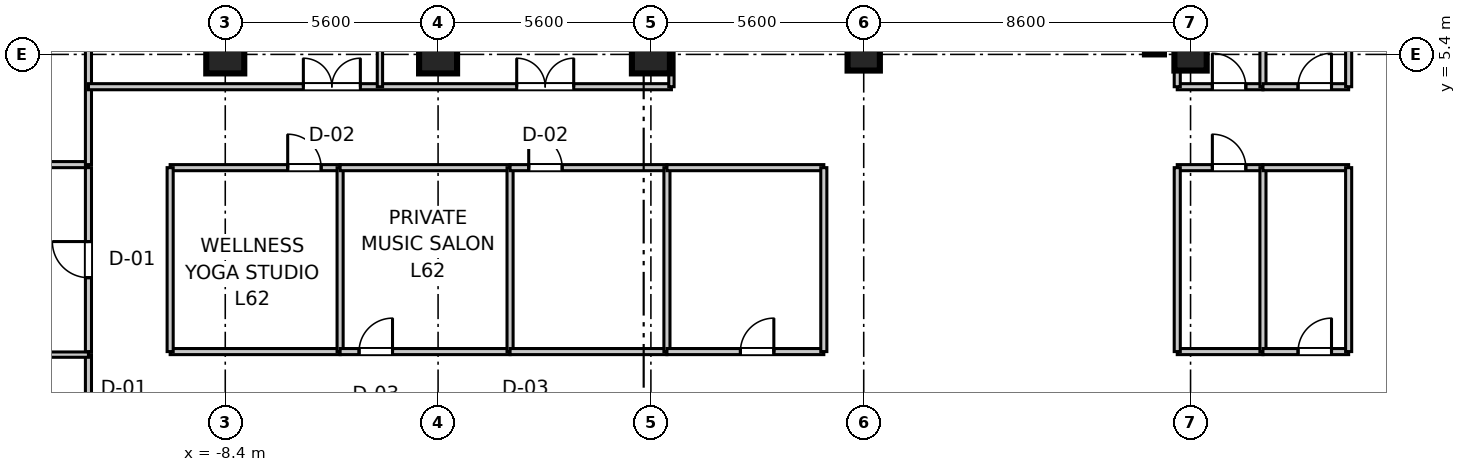
"""IFC4 building model, lengths in metres.
Left out: names, types, materials, properties, quantities, classifications, styles, units other than length and angle.
Written with IfcOpenShell. Run it as: python <this file> out.ifc"""

import sys

from ifc_helpers import new_model, si_unit, direction, frame, frame_2d, origin, origin_2d, place, context, subcontext, project, spatial, rectangle, extrude, source, transform, mapped, element, fill, save


model = new_model("IFC4")
c1 = context("Model", 3, precision=1e-05, world=origin(), true_north=direction((0.0, 1.0)))
c2 = subcontext(c1, "Body", "Model", "MODEL_VIEW")
j1 = project(units=[si_unit("LENGTHUNIT", "METRE"), si_unit("PLANEANGLEUNIT", "RADIAN")], contexts=[c1])
p1 = place(None, origin())
s1 = spatial("IfcSite", under=j1, at=p1, CompositionType="ELEMENT")
p2 = place(p1, origin())
s2 = spatial("IfcBuilding", under=s1, at=p2, CompositionType="ELEMENT")
p3 = place(p2, frame((0.0, 0.0, 241.9)))
s3 = spatial("IfcBuildingStorey", under=s2, at=p3, CompositionType="ELEMENT", Elevation=241.9)
m1 = source(origin(), c2, "Body", "SweptSolid", [
    extrude(rectangle(XDim=1.0, YDim=1.0, at=origin_2d()), origin(), (0.0, 0.0, 1.0), 3.655),
])
for number, where, z_axis, x_axis in (
    (1, (-8.4, 5.4, 0.0), (0.0, 0.0, 1.0), (1.0, 0.0, 0.0)),
    (2, (-2.8, 5.4, 0.0), (0.0, 0.0, 1.0), (1.0, 0.0, 0.0)),
    (3, (2.8, 5.4, 0.0), (0.0, 0.0, 1.0), (1.0, 0.0, 0.0)),
):
    element("IfcColumn", number, at=place(p3, frame(where, z_axis=z_axis, x_axis=x_axis)), inside=s3, PredefinedType="COLUMN", context=c2, shape_type="MappedRepresentation", body=[
        mapped(m1, transform((0.0, 0.0, 0.0), scale=1.0)),
    ])
m2 = source(origin(), c2, "Body", "SweptSolid", [
    extrude(rectangle(XDim=0.85, YDim=0.85, at=origin_2d()), origin(), (0.0, 0.0, 1.0), 3.655),
])
for number, where, z_axis, x_axis in (
    (4, (8.4, 5.4, 0.0), (0.0, 0.0, 1.0), (1.0, 0.0, 0.0)),
    (5, (17.0, 5.4, 0.0), (0.0, 0.0, 1.0), (1.0, 0.0, 0.0)),
):
    element("IfcColumn", number, at=place(p3, frame(where, z_axis=z_axis, x_axis=x_axis)), inside=s3, PredefinedType="PILASTER", context=c2, shape_type="MappedRepresentation", body=[
        mapped(m2, transform((0.0, 0.0, 0.0), scale=1.0)),
    ])
m3 = source(origin(), c2, "Body", "SweptSolid", [
    extrude(rectangle(XDim=11.6, YDim=0.5, at=frame_2d((5.8, 0.0))), origin(), (0.0, 0.0, 1.0), 3.41),
])
p4 = place(p3, frame((16.05, 5.4, 0.0), z_axis=(0.0, 0.0, 1.0), x_axis=(0.0, 1.0, 0.0)))
e6 = element("IfcWall", 6, at=p4, inside=s3, PredefinedType="SHEAR", context=c2, shape_type="MappedRepresentation", body=[
    mapped(m3, transform((0.0, 0.0, 0.0), scale=1.0)),
])
m4 = source(origin(), c2, "Body", "SweptSolid", [
    extrude(rectangle(XDim=2.255, YDim=0.16, at=frame_2d((1.127, 0.0))), origin(), (0.0, 0.0, 1.0), 2.75),
])
p5 = place(p3, frame((16.65, 4.55, 0.0), z_axis=(0.0, 0.0, 1.0), x_axis=(1.0, 0.0, 0.0)))
e7 = element("IfcWall", 7, at=p5, inside=s3, PredefinedType="PARTITIONING", context=c2, shape_type="MappedRepresentation", body=[
    mapped(m4, transform((0.0, 0.0, 0.0), scale=1.0)),
])
p6 = place(p5, frame((0.924, 0.0, 0.0)))
e8 = element("IfcOpeningElement", 8, at=p6, cuts=e7, PredefinedType="OPENING", context=c2, shape_type="SweptSolid", body=[
    extrude(rectangle(XDim=0.88, YDim=2.1, at=frame_2d((0.44, 1.05))), frame((0.0, 0.09, 0.0), z_axis=(0.0, -1.0, 0.0), x_axis=(1.0, 0.0, 0.0)), (0.0, 0.0, 1.0), 0.18),
])
m5 = source(origin(), c2, "Body", "SweptSolid", [
    extrude(rectangle(XDim=19.35, YDim=0.16, at=frame_2d((9.675, 0.0))), origin(), (0.0, 0.0, 1.0), 2.75),
])
for number, where, z_axis, x_axis in (
    (9, (16.65, 4.55, 0.0), (0.0, 0.0, 1.0), (0.0, 1.0, 0.0)),
    (10, (18.905, 4.55, 0.0), (0.0, 0.0, 1.0), (0.0, 1.0, 0.0)),
):
    element("IfcWall", number, at=place(p3, frame(where, z_axis=z_axis, x_axis=x_axis)), inside=s3, PredefinedType="PARTITIONING", context=c2, shape_type="MappedRepresentation", body=[
        mapped(m5, transform((0.0, 0.0, 0.0), scale=1.0)),
    ])
m6 = source(origin(), c2, "Body", "SweptSolid", [
    extrude(rectangle(XDim=2.255, YDim=0.16, at=frame_2d((1.127, 0.0))), origin(), (0.0, 0.0, 1.0), 2.75),
])
p7 = place(p3, frame((18.905, 4.55, 0.0), z_axis=(0.0, 0.0, 1.0), x_axis=(1.0, 0.0, 0.0)))
e11 = element("IfcWall", 11, at=p7, inside=s3, PredefinedType="PARTITIONING", context=c2, shape_type="MappedRepresentation", body=[
    mapped(m6, transform((0.0, 0.0, 0.0), scale=1.0)),
])
p8 = place(p7, frame((0.924, 0.0, 0.0)))
e12 = element("IfcOpeningElement", 12, at=p8, cuts=e11, PredefinedType="OPENING", context=c2, shape_type="SweptSolid", body=[
    extrude(rectangle(XDim=0.88, YDim=2.1, at=frame_2d((0.44, 1.05))), frame((0.0, 0.09, 0.0), z_axis=(0.0, -1.0, 0.0), x_axis=(1.0, 0.0, 0.0)), (0.0, 0.0, 1.0), 0.18),
])
m7 = source(origin(), c2, "Body", "SweptSolid", [
    extrude(rectangle(XDim=17.93, YDim=0.16, at=frame_2d((8.965, 0.0))), origin(), (0.0, 0.0, 1.0), 2.75),
])
p9 = place(p3, frame((21.16, 4.55, 0.0), z_axis=(0.0, 0.0, 1.0), x_axis=(0.0, 1.0, 0.0)))
e13 = element("IfcWall", 13, at=p9, inside=s3, PredefinedType="PARTITIONING", context=c2, shape_type="MappedRepresentation", body=[
    mapped(m7, transform((0.0, 0.0, 0.0), scale=1.0)),
])
m8 = source(origin(), c2, "Body", "SweptSolid", [
    extrude(rectangle(XDim=9.16, YDim=0.16, at=frame_2d((4.58, 0.0))), origin(), (0.0, 0.0, 1.0), 2.75),
])
p10 = place(p3, frame((-21.16, 2.5, 0.0), z_axis=(0.0, 0.0, 1.0), x_axis=(1.0, 0.0, 0.0)))
e14 = element("IfcWall", 14, at=p10, inside=s3, PredefinedType="PARTITIONING", context=c2, shape_type="MappedRepresentation", body=[
    mapped(m8, transform((0.0, 0.0, 0.0), scale=1.0)),
])
m9 = source(origin(), c2, "Body", "SweptSolid", [
    extrude(rectangle(XDim=10.7, YDim=0.16, at=frame_2d((5.35, 0.0))), origin(), (0.0, 0.0, 1.0), 2.75),
])
p11 = place(p3, frame((-12.0, 2.5, 0.0), z_axis=(0.0, 0.0, 1.0), x_axis=(0.0, 1.0, 0.0)))
e15 = element("IfcWall", 15, at=p11, inside=s3, PredefinedType="PARTITIONING", context=c2, shape_type="MappedRepresentation", body=[
    mapped(m9, transform((0.0, 0.0, 0.0), scale=1.0)),
])
p12 = place(p11, frame((4.91, 0.0, 0.0)))
e16 = element("IfcOpeningElement", 16, at=p12, cuts=e15, PredefinedType="OPENING", context=c2, shape_type="SweptSolid", body=[
    extrude(rectangle(XDim=0.88, YDim=2.1, at=frame_2d((0.44, 1.05))), frame((0.0, 0.09, 0.0), z_axis=(0.0, -1.0, 0.0), x_axis=(1.0, 0.0, 0.0)), (0.0, 0.0, 1.0), 0.18),
])
m10 = source(origin(), c2, "Body", "SweptSolid", [
    extrude(rectangle(XDim=15.34, YDim=0.16, at=frame_2d((7.67, 0.0))), origin(), (0.0, 0.0, 1.0), 2.75),
])
p13 = place(p3, frame((-12.0, 4.55, 0.0), z_axis=(0.0, 0.0, 1.0), x_axis=(1.0, 0.0, 0.0)))
e17 = element("IfcWall", 17, at=p13, inside=s3, PredefinedType="PARTITIONING", context=c2, shape_type="MappedRepresentation", body=[
    mapped(m10, transform((0.0, 0.0, 0.0), scale=1.0)),
])
p14 = place(p13, frame((5.655, 0.0, 0.0)))
e18 = element("IfcOpeningElement", 18, at=p14, cuts=e17, PredefinedType="OPENING", context=c2, shape_type="SweptSolid", body=[
    extrude(rectangle(XDim=1.5, YDim=2.15, at=frame_2d((0.75, 1.075))), frame((0.0, 0.09, 0.0), z_axis=(0.0, -1.0, 0.0), x_axis=(1.0, 0.0, 0.0)), (0.0, 0.0, 1.0), 0.18),
])
p15 = place(p13, frame((11.269, 0.0, 0.0)))
e19 = element("IfcOpeningElement", 19, at=p15, cuts=e17, PredefinedType="OPENING", context=c2, shape_type="SweptSolid", body=[
    extrude(rectangle(XDim=1.5, YDim=2.15, at=frame_2d((0.75, 1.075))), frame((0.0, 0.09, 0.0), z_axis=(0.0, -1.0, 0.0), x_axis=(1.0, 0.0, 0.0)), (0.0, 0.0, 1.0), 0.18),
])
m11 = source(origin(), c2, "Body", "SweptSolid", [
    extrude(rectangle(XDim=19.35, YDim=0.14, at=frame_2d((9.675, 0.0))), origin(), (0.0, 0.0, 1.0), 2.75),
])
for number, where, z_axis, x_axis in (
    (20, (3.34, 4.55, 0.0), (0.0, 0.0, 1.0), (0.0, 1.0, 0.0)),
    (21, (-4.33, 4.55, 0.0), (0.0, 0.0, 1.0), (0.0, 1.0, 0.0)),
):
    element("IfcWall", number, at=place(p3, frame(where, z_axis=z_axis, x_axis=x_axis)), inside=s3, PredefinedType="PARTITIONING", context=c2, shape_type="MappedRepresentation", body=[
        mapped(m11, transform((0.0, 0.0, 0.0), scale=1.0)),
    ])
m12 = source(origin(), c2, "Body", "SweptSolid", [
    extrude(rectangle(XDim=21.4, YDim=0.16, at=frame_2d((10.7, 0.0))), origin(), (0.0, 0.0, 1.0), 2.75),
])
p16 = place(p3, frame((-12.0, -23.9, 0.0), z_axis=(0.0, 0.0, 1.0), x_axis=(0.0, 1.0, 0.0)))
e22 = element("IfcWall", 22, at=p16, inside=s3, PredefinedType="PARTITIONING", context=c2, shape_type="MappedRepresentation", body=[
    mapped(m12, transform((0.0, 0.0, 0.0), scale=1.0)),
])
p17 = place(p16, frame((12.3, 0.0, 0.0)))
e23 = element("IfcOpeningElement", 23, at=p17, cuts=e22, PredefinedType="OPENING", context=c2, shape_type="SweptSolid", body=[
    extrude(rectangle(XDim=0.95, YDim=2.1, at=frame_2d((0.475, 1.05))), frame((0.0, 0.09, 0.0), z_axis=(0.0, -1.0, 0.0), x_axis=(1.0, 0.0, 0.0)), (0.0, 0.0, 1.0), 0.18),
])
m13 = source(origin(), c2, "Body", "SweptSolid", [
    extrude(rectangle(XDim=9.16, YDim=0.14, at=frame_2d((4.58, 0.0))), origin(), (0.0, 0.0, 1.0), 2.75),
])
p18 = place(p3, frame((-21.16, -2.5, 0.0), z_axis=(0.0, 0.0, 1.0), x_axis=(1.0, 0.0, 0.0)))
e24 = element("IfcWall", 24, at=p18, inside=s3, PredefinedType="PARTITIONING", context=c2, shape_type="MappedRepresentation", body=[
    mapped(m13, transform((0.0, 0.0, 0.0), scale=1.0)),
])
m14 = source(origin(), c2, "Body", "SweptSolid", [
    extrude(rectangle(XDim=4.84, YDim=0.16, at=frame_2d((2.42, 0.0))), origin(), (0.0, 0.0, 1.0), 2.75),
])
p19 = place(p3, frame((-12.0, -2.42, 0.0), z_axis=(0.0, 0.0, 1.0), x_axis=(0.0, 1.0, 0.0)))
e25 = element("IfcWall", 25, at=p19, inside=s3, PredefinedType="PARTITIONING", context=c2, shape_type="MappedRepresentation", body=[
    mapped(m14, transform((0.0, 0.0, 0.0), scale=1.0)),
])
p20 = place(p19, frame((1.945, 0.0, 0.0)))
e26 = element("IfcOpeningElement", 26, at=p20, cuts=e25, PredefinedType="OPENING", context=c2, shape_type="SweptSolid", body=[
    extrude(rectangle(XDim=0.95, YDim=2.1, at=frame_2d((0.475, 1.05))), frame((0.0, 0.09, 0.0), z_axis=(0.0, -1.0, 0.0), x_axis=(1.0, 0.0, 0.0)), (0.0, 0.0, 1.0), 0.18),
])
m15 = source(origin(), c2, "Body", "SweptSolid", [
    extrude(rectangle(XDim=4.472, YDim=0.16, at=frame_2d((2.236, 0.0))), origin(), (0.0, 0.0, 1.0), 2.75),
])
p21 = place(p3, frame((-9.85, -2.42, 0.0), z_axis=(0.0, 0.0, 1.0), x_axis=(1.0, 0.0, 0.0)))
e27 = element("IfcWall", 27, at=p21, inside=s3, PredefinedType="PARTITIONING", context=c2, shape_type="MappedRepresentation", body=[
    mapped(m15, transform((0.0, 0.0, 0.0), scale=1.0)),
])
p22 = place(p3, frame((-9.85, 2.42, 0.0), z_axis=(0.0, 0.0, 1.0), x_axis=(1.0, 0.0, 0.0)))
e28 = element("IfcWall", 28, at=p22, inside=s3, PredefinedType="PARTITIONING", context=c2, shape_type="MappedRepresentation", body=[
    mapped(m15, transform((0.0, 0.0, 0.0), scale=1.0)),
])
p23 = place(p22, frame((3.093, 0.0, 0.0)))
e29 = element("IfcOpeningElement", 29, at=p23, cuts=e28, PredefinedType="OPENING", context=c2, shape_type="SweptSolid", body=[
    extrude(rectangle(XDim=0.88, YDim=2.1, at=frame_2d((0.44, 1.05))), frame((0.0, 0.09, 0.0), z_axis=(0.0, -1.0, 0.0), x_axis=(1.0, 0.0, 0.0)), (0.0, 0.0, 1.0), 0.18),
])
for number, where, z_axis, x_axis in (
    (30, (-9.85, -2.42, 0.0), (0.0, 0.0, 1.0), (0.0, 1.0, 0.0)),
    (31, (-5.378, -2.42, 0.0), (0.0, 0.0, 1.0), (0.0, 1.0, 0.0)),
):
    element("IfcWall", number, at=place(p3, frame(where, z_axis=z_axis, x_axis=x_axis)), inside=s3, PredefinedType="PARTITIONING", context=c2, shape_type="MappedRepresentation", body=[
        mapped(m14, transform((0.0, 0.0, 0.0), scale=1.0)),
    ])
m16 = source(origin(), c2, "Body", "SweptSolid", [
    extrude(rectangle(XDim=4.472, YDim=0.16, at=frame_2d((2.236, 0.0))), origin(), (0.0, 0.0, 1.0), 2.75),
])
p24 = place(p3, frame((-5.378, -2.42, 0.0), z_axis=(0.0, 0.0, 1.0), x_axis=(1.0, 0.0, 0.0)))
e32 = element("IfcWall", 32, at=p24, inside=s3, PredefinedType="PARTITIONING", context=c2, shape_type="MappedRepresentation", body=[
    mapped(m16, transform((0.0, 0.0, 0.0), scale=1.0)),
])
p25 = place(p24, frame((0.499, 0.0, 0.0)))
e33 = element("IfcOpeningElement", 33, at=p25, cuts=e32, PredefinedType="OPENING", context=c2, shape_type="SweptSolid", body=[
    extrude(rectangle(XDim=0.88, YDim=2.1, at=frame_2d((0.44, 1.05))), frame((0.0, 0.09, 0.0), z_axis=(0.0, -1.0, 0.0), x_axis=(1.0, 0.0, 0.0)), (0.0, 0.0, 1.0), 0.18),
])
p26 = place(p3, frame((-5.378, 2.42, 0.0), z_axis=(0.0, 0.0, 1.0), x_axis=(1.0, 0.0, 0.0)))
e34 = element("IfcWall", 34, at=p26, inside=s3, PredefinedType="PARTITIONING", context=c2, shape_type="MappedRepresentation", body=[
    mapped(m16, transform((0.0, 0.0, 0.0), scale=1.0)),
])
p27 = place(p3, frame((-0.906, -2.42, 0.0), z_axis=(0.0, 0.0, 1.0), x_axis=(0.0, 1.0, 0.0)))
e35 = element("IfcWall", 35, at=p27, inside=s3, PredefinedType="PARTITIONING", context=c2, shape_type="MappedRepresentation", body=[
    mapped(m14, transform((0.0, 0.0, 0.0), scale=1.0)),
])
m17 = source(origin(), c2, "Body", "SweptSolid", [
    extrude(rectangle(XDim=4.128, YDim=0.16, at=frame_2d((2.064, 0.0))), origin(), (0.0, 0.0, 1.0), 2.75),
])
p28 = place(p3, frame((-0.906, -2.42, 0.0), z_axis=(0.0, 0.0, 1.0), x_axis=(1.0, 0.0, 0.0)))
e36 = element("IfcWall", 36, at=p28, inside=s3, PredefinedType="PARTITIONING", context=c2, shape_type="MappedRepresentation", body=[
    mapped(m17, transform((0.0, 0.0, 0.0), scale=1.0)),
])
p29 = place(p3, frame((-0.906, 2.42, 0.0), z_axis=(0.0, 0.0, 1.0), x_axis=(1.0, 0.0, 0.0)))
e37 = element("IfcWall", 37, at=p29, inside=s3, PredefinedType="PARTITIONING", context=c2, shape_type="MappedRepresentation", body=[
    mapped(m17, transform((0.0, 0.0, 0.0), scale=1.0)),
])
p30 = place(p29, frame((0.491, 0.0, 0.0)))
e38 = element("IfcOpeningElement", 38, at=p30, cuts=e37, PredefinedType="OPENING", context=c2, shape_type="SweptSolid", body=[
    extrude(rectangle(XDim=0.88, YDim=2.1, at=frame_2d((0.44, 1.05))), frame((0.0, 0.09, 0.0), z_axis=(0.0, -1.0, 0.0), x_axis=(1.0, 0.0, 0.0)), (0.0, 0.0, 1.0), 0.18),
])
p31 = place(p3, frame((3.222, -2.42, 0.0), z_axis=(0.0, 0.0, 1.0), x_axis=(0.0, 1.0, 0.0)))
e39 = element("IfcWall", 39, at=p31, inside=s3, PredefinedType="PARTITIONING", context=c2, shape_type="MappedRepresentation", body=[
    mapped(m14, transform((0.0, 0.0, 0.0), scale=1.0)),
])
m18 = source(origin(), c2, "Body", "SweptSolid", [
    extrude(rectangle(XDim=4.128, YDim=0.16, at=frame_2d((2.064, 0.0))), origin(), (0.0, 0.0, 1.0), 2.75),
])
p32 = place(p3, frame((3.222, -2.42, 0.0), z_axis=(0.0, 0.0, 1.0), x_axis=(1.0, 0.0, 0.0)))
e40 = element("IfcWall", 40, at=p32, inside=s3, PredefinedType="PARTITIONING", context=c2, shape_type="MappedRepresentation", body=[
    mapped(m18, transform((0.0, 0.0, 0.0), scale=1.0)),
])
p33 = place(p32, frame((1.933, 0.0, 0.0)))
e41 = element("IfcOpeningElement", 41, at=p33, cuts=e40, PredefinedType="OPENING", context=c2, shape_type="SweptSolid", body=[
    extrude(rectangle(XDim=0.88, YDim=2.1, at=frame_2d((0.44, 1.05))), frame((0.0, 0.09, 0.0), z_axis=(0.0, -1.0, 0.0), x_axis=(1.0, 0.0, 0.0)), (0.0, 0.0, 1.0), 0.18),
])
p34 = place(p3, frame((3.222, 2.42, 0.0), z_axis=(0.0, 0.0, 1.0), x_axis=(1.0, 0.0, 0.0)))
e42 = element("IfcWall", 42, at=p34, inside=s3, PredefinedType="PARTITIONING", context=c2, shape_type="MappedRepresentation", body=[
    mapped(m18, transform((0.0, 0.0, 0.0), scale=1.0)),
])
p35 = place(p3, frame((7.35, -2.42, 0.0), z_axis=(0.0, 0.0, 1.0), x_axis=(0.0, 1.0, 0.0)))
e43 = element("IfcWall", 43, at=p35, inside=s3, PredefinedType="PARTITIONING", context=c2, shape_type="MappedRepresentation", body=[
    mapped(m14, transform((0.0, 0.0, 0.0), scale=1.0)),
])
p36 = place(p3, frame((16.65, -2.42, 0.0), z_axis=(0.0, 0.0, 1.0), x_axis=(1.0, 0.0, 0.0)))
e44 = element("IfcWall", 44, at=p36, inside=s3, PredefinedType="PARTITIONING", context=c2, shape_type="MappedRepresentation", body=[
    mapped(m4, transform((0.0, 0.0, 0.0), scale=1.0)),
])
p37 = place(p3, frame((16.65, 2.42, 0.0), z_axis=(0.0, 0.0, 1.0), x_axis=(1.0, 0.0, 0.0)))
e45 = element("IfcWall", 45, at=p37, inside=s3, PredefinedType="PARTITIONING", context=c2, shape_type="MappedRepresentation", body=[
    mapped(m4, transform((0.0, 0.0, 0.0), scale=1.0)),
])
p38 = place(p37, frame((0.924, 0.0, 0.0)))
e46 = element("IfcOpeningElement", 46, at=p38, cuts=e45, PredefinedType="OPENING", context=c2, shape_type="SweptSolid", body=[
    extrude(rectangle(XDim=0.88, YDim=2.1, at=frame_2d((0.44, 1.05))), frame((0.0, 0.09, 0.0), z_axis=(0.0, -1.0, 0.0), x_axis=(1.0, 0.0, 0.0)), (0.0, 0.0, 1.0), 0.18),
])
for number, where, z_axis, x_axis in (
    (47, (16.65, -2.42, 0.0), (0.0, 0.0, 1.0), (0.0, 1.0, 0.0)),
    (48, (18.905, -2.42, 0.0), (0.0, 0.0, 1.0), (0.0, 1.0, 0.0)),
):
    element("IfcWall", number, at=place(p3, frame(where, z_axis=z_axis, x_axis=x_axis)), inside=s3, PredefinedType="PARTITIONING", context=c2, shape_type="MappedRepresentation", body=[
        mapped(m14, transform((0.0, 0.0, 0.0), scale=1.0)),
    ])
p39 = place(p3, frame((18.905, -2.42, 0.0), z_axis=(0.0, 0.0, 1.0), x_axis=(1.0, 0.0, 0.0)))
e49 = element("IfcWall", 49, at=p39, inside=s3, PredefinedType="PARTITIONING", context=c2, shape_type="MappedRepresentation", body=[
    mapped(m6, transform((0.0, 0.0, 0.0), scale=1.0)),
])
p40 = place(p39, frame((0.924, 0.0, 0.0)))
e50 = element("IfcOpeningElement", 50, at=p40, cuts=e49, PredefinedType="OPENING", context=c2, shape_type="SweptSolid", body=[
    extrude(rectangle(XDim=0.88, YDim=2.1, at=frame_2d((0.44, 1.05))), frame((0.0, 0.09, 0.0), z_axis=(0.0, -1.0, 0.0), x_axis=(1.0, 0.0, 0.0)), (0.0, 0.0, 1.0), 0.18),
])
p41 = place(p3, frame((18.905, 2.42, 0.0), z_axis=(0.0, 0.0, 1.0), x_axis=(1.0, 0.0, 0.0)))
e51 = element("IfcWall", 51, at=p41, inside=s3, PredefinedType="PARTITIONING", context=c2, shape_type="MappedRepresentation", body=[
    mapped(m6, transform((0.0, 0.0, 0.0), scale=1.0)),
])
p42 = place(p3, frame((21.16, -2.42, 0.0), z_axis=(0.0, 0.0, 1.0), x_axis=(0.0, 1.0, 0.0)))
e52 = element("IfcWall", 52, at=p42, inside=s3, PredefinedType="PARTITIONING", context=c2, shape_type="MappedRepresentation", body=[
    mapped(m14, transform((0.0, 0.0, 0.0), scale=1.0)),
])
m19 = source(origin(), c2, "Body", "SweptSolid", [
    extrude(rectangle(XDim=0.88, YDim=2.1, at=frame_2d((0.44, 1.05))), frame((0.0, 0.025, 0.0), z_axis=(0.0, -1.0, 0.0), x_axis=(1.0, 0.0, 0.0)), (0.0, 0.0, 1.0), 0.05),
])
p43 = place(p6, origin())
e53 = element("IfcDoor", 53, at=p43, inside=s3, OperationType="SINGLE_SWING_LEFT", PredefinedType="DOOR", context=c2, shape_type="MappedRepresentation", body=[
    mapped(m19, transform((0.0, 0.0, 0.0), scale=1.0)),
])
fill(e8, e53)
p44 = place(p8, origin())
e54 = element("IfcDoor", 54, at=p44, inside=s3, OperationType="SINGLE_SWING_RIGHT", PredefinedType="DOOR", context=c2, shape_type="MappedRepresentation", body=[
    mapped(m19, transform((0.0, 0.0, 0.0), scale=1.0)),
])
fill(e12, e54)
m20 = source(origin(), c2, "Body", "SweptSolid", [
    extrude(rectangle(XDim=1.5, YDim=2.15, at=frame_2d((0.75, 1.075))), frame((0.0, 0.025, 0.0), z_axis=(0.0, -1.0, 0.0), x_axis=(1.0, 0.0, 0.0)), (0.0, 0.0, 1.0), 0.05),
])
p45 = place(p14, origin())
e55 = element("IfcDoor", 55, at=p45, inside=s3, OperationType="DOUBLE_DOOR_SINGLE_SWING", PredefinedType="DOOR", context=c2, shape_type="MappedRepresentation", body=[
    mapped(m20, transform((0.0, 0.0, 0.0), scale=1.0)),
])
fill(e18, e55)
p46 = place(p15, origin())
e56 = element("IfcDoor", 56, at=p46, inside=s3, OperationType="DOUBLE_DOOR_SINGLE_SWING", PredefinedType="DOOR", context=c2, shape_type="MappedRepresentation", body=[
    mapped(m20, transform((0.0, 0.0, 0.0), scale=1.0)),
])
fill(e19, e56)
m21 = source(origin(), c2, "Body", "SweptSolid", [
    extrude(rectangle(XDim=0.95, YDim=2.1, at=frame_2d((0.475, 1.05))), frame((0.0, 0.025, 0.0), z_axis=(0.0, -1.0, 0.0), x_axis=(1.0, 0.0, 0.0)), (0.0, 0.0, 1.0), 0.05),
])
p47 = place(p20, origin())
e57 = element("IfcDoor", 57, at=p47, inside=s3, OperationType="SINGLE_SWING_RIGHT", PredefinedType="DOOR", context=c2, shape_type="MappedRepresentation", body=[
    mapped(m21, transform((0.0, 0.0, 0.0), scale=1.0)),
])
fill(e26, e57)
p48 = place(p23, frame((0.88, 0.0, 0.0), z_axis=(0.0, 0.0, 1.0), x_axis=(-1.0, 0.0, 0.0)))
e58 = element("IfcDoor", 58, at=p48, inside=s3, OperationType="SINGLE_SWING_LEFT", PredefinedType="DOOR", context=c2, shape_type="MappedRepresentation", body=[
    mapped(m19, transform((0.0, 0.0, 0.0), scale=1.0)),
])
fill(e29, e58)
p49 = place(p25, origin())
e59 = element("IfcDoor", 59, at=p49, inside=s3, OperationType="SINGLE_SWING_RIGHT", PredefinedType="DOOR", context=c2, shape_type="MappedRepresentation", body=[
    mapped(m19, transform((0.0, 0.0, 0.0), scale=1.0)),
])
fill(e33, e59)
p50 = place(p30, frame((0.88, 0.0, 0.0), z_axis=(0.0, 0.0, 1.0), x_axis=(-1.0, 0.0, 0.0)))
e60 = element("IfcDoor", 60, at=p50, inside=s3, OperationType="SINGLE_SWING_LEFT", PredefinedType="DOOR", context=c2, shape_type="MappedRepresentation", body=[
    mapped(m19, transform((0.0, 0.0, 0.0), scale=1.0)),
])
fill(e38, e60)
p51 = place(p33, origin())
e61 = element("IfcDoor", 61, at=p51, inside=s3, OperationType="SINGLE_SWING_RIGHT", PredefinedType="DOOR", context=c2, shape_type="MappedRepresentation", body=[
    mapped(m19, transform((0.0, 0.0, 0.0), scale=1.0)),
])
fill(e41, e61)
p52 = place(p38, frame((0.88, 0.0, 0.0), z_axis=(0.0, 0.0, 1.0), x_axis=(-1.0, 0.0, 0.0)))
e62 = element("IfcDoor", 62, at=p52, inside=s3, OperationType="SINGLE_SWING_LEFT", PredefinedType="DOOR", context=c2, shape_type="MappedRepresentation", body=[
    mapped(m19, transform((0.0, 0.0, 0.0), scale=1.0)),
])
fill(e46, e62)
p53 = place(p40, origin())
e63 = element("IfcDoor", 63, at=p53, inside=s3, OperationType="SINGLE_SWING_RIGHT", PredefinedType="DOOR", context=c2, shape_type="MappedRepresentation", body=[
    mapped(m19, transform((0.0, 0.0, 0.0), scale=1.0)),
])
fill(e50, e63)
save(model, sys.argv[1])
